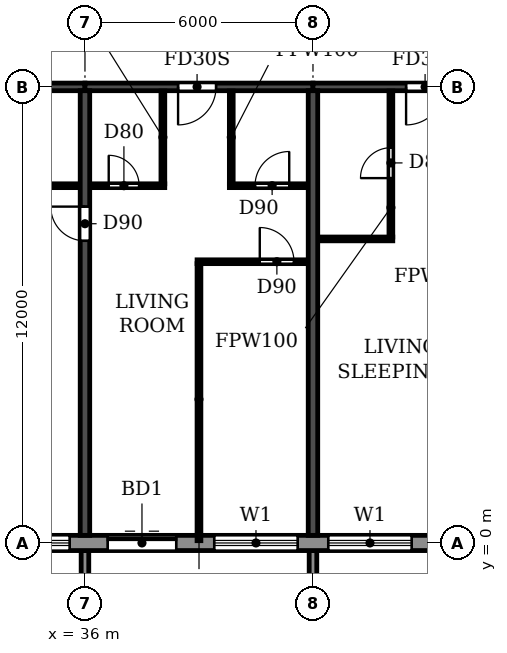
"""IFC4 building model, lengths in metres.
Left out: names, types, materials, properties, quantities, classifications, styles, units other than length and angle.
Written with IfcOpenShell. Run it as: python <this file> out.ifc"""

import sys

from ifc_helpers import new_model, si_unit, direction, frame, frame_2d, origin, place, context, subcontext, project, spatial, polyline, rectangle, outline, extrude, source, transform, mapped, element, fill, save


model = new_model("IFC4")
c1 = context("Model", 3, precision=1e-05, world=origin(), true_north=direction((0.0, 1.0)))
c2 = subcontext(c1, "Body", "Model", "MODEL_VIEW")
j1 = project(units=[si_unit("LENGTHUNIT", "METRE"), si_unit("PLANEANGLEUNIT", "RADIAN")], contexts=[c1])
p1 = place(None, origin())
s1 = spatial("IfcSite", under=j1, at=p1, CompositionType="ELEMENT")
p2 = place(p1, origin())
s2 = spatial("IfcBuilding", under=s1, at=p2, CompositionType="ELEMENT")
p3 = place(p2, frame((0.0, 0.0, 208.2)))
s3 = spatial("IfcBuildingStorey", under=s2, at=p3, CompositionType="ELEMENT", Elevation=208.2)
p4 = place(p3, frame((36.0, 0.2, 0.0), z_axis=(0.0, 0.0, 1.0), x_axis=(0.0, 1.0, 0.0)))
e1 = element("IfcWall", 1, at=p4, inside=s3, PredefinedType="SHEAR", context=c2, shape_type="SweptSolid", body=[
    extrude(rectangle(XDim=11.7, YDim=0.25, at=frame_2d((5.85, 0.0))), origin(), (0.0, 0.0, 1.0), 3.0),
])
p5 = place(p4, frame((7.75, 0.0, 0.0)))
e2 = element("IfcOpeningElement", 2, at=p5, cuts=e1, PredefinedType="OPENING", context=c2, shape_type="SweptSolid", body=[
    extrude(rectangle(XDim=0.9, YDim=2.1, at=frame_2d((0.45, 1.05))), frame((0.0, 0.135, 0.0), z_axis=(0.0, -1.0, 0.0), x_axis=(1.0, 0.0, 0.0)), (0.0, 0.0, 1.0), 0.27),
])
p6 = place(p3, frame((42.0, 0.2, 0.0), z_axis=(0.0, 0.0, 1.0), x_axis=(0.0, 1.0, 0.0)))
e3 = element("IfcWall", 3, at=p6, inside=s3, PredefinedType="SHEAR", context=c2, shape_type="SweptSolid", body=[
    extrude(rectangle(XDim=11.7, YDim=0.25, at=frame_2d((5.85, 0.0))), origin(), (0.0, 0.0, 1.0), 3.0),
])
p7 = place(p3, frame((30.0, 12.0, 0.0), z_axis=(0.0, 0.0, 1.0), x_axis=(1.0, 0.0, 0.0)))
e4 = element("IfcWall", 4, at=p7, inside=s3, PredefinedType="SHEAR", context=c2, shape_type="SweptSolid", body=[
    extrude(rectangle(XDim=6.0, YDim=0.2, at=frame_2d((3.0, 0.0))), origin(), (0.0, 0.0, 1.0), 2.4),
])
p8 = place(p3, frame((36.0, 12.0, 0.0), z_axis=(0.0, 0.0, 1.0), x_axis=(1.0, 0.0, 0.0)))
e5 = element("IfcWall", 5, at=p8, inside=s3, PredefinedType="SHEAR", context=c2, shape_type="SweptSolid", body=[
    extrude(rectangle(XDim=6.0, YDim=0.2, at=frame_2d((3.0, 0.0))), origin(), (0.0, 0.0, 1.0), 2.4),
])
p9 = place(p8, frame((2.45, 0.0, 0.0)))
e6 = element("IfcOpeningElement", 6, at=p9, cuts=e5, PredefinedType="OPENING", context=c2, shape_type="SweptSolid", body=[
    extrude(rectangle(XDim=1.0, YDim=2.1, at=frame_2d((0.5, 1.05))), frame((0.0, 0.11, 0.0), z_axis=(0.0, -1.0, 0.0), x_axis=(1.0, 0.0, 0.0)), (0.0, 0.0, 1.0), 0.22),
])
p10 = place(p3, frame((42.0, 12.0, 0.0), z_axis=(0.0, 0.0, 1.0), x_axis=(1.0, 0.0, 0.0)))
e7 = element("IfcWall", 7, at=p10, inside=s3, PredefinedType="SHEAR", context=c2, shape_type="SweptSolid", body=[
    extrude(rectangle(XDim=6.0, YDim=0.2, at=frame_2d((3.0, 0.0))), origin(), (0.0, 0.0, 1.0), 2.4),
])
p11 = place(p10, frame((2.45, 0.0, 0.0)))
e8 = element("IfcOpeningElement", 8, at=p11, cuts=e7, PredefinedType="OPENING", context=c2, shape_type="SweptSolid", body=[
    extrude(rectangle(XDim=1.0, YDim=2.1, at=frame_2d((0.5, 1.05))), frame((0.0, 0.11, 0.0), z_axis=(0.0, -1.0, 0.0), x_axis=(1.0, 0.0, 0.0)), (0.0, 0.0, 1.0), 0.22),
])
p12 = place(p3, frame((22.683, 0.0, 0.0), z_axis=(0.0, 0.0, 1.0), x_axis=(1.0, 0.0, 0.0)))
e9 = element("IfcWall", 9, at=p12, inside=s3, PredefinedType="STANDARD", context=c2, shape_type="SweptSolid", body=[
    extrude(rectangle(XDim=56.634, YDim=0.4, at=frame_2d((28.317, 0.0))), origin(), (0.0, 0.0, 1.0), 3.0),
])
p13 = place(p12, frame((1.917, 0.0, 0.0)))
e10 = element("IfcOpeningElement", 10, at=p13, cuts=e9, PredefinedType="OPENING", context=c2, shape_type="SweptSolid", body=[
    extrude(rectangle(XDim=1.8, YDim=2.4, at=frame_2d((0.9, 1.2))), frame((0.0, 0.21, 0.0), z_axis=(0.0, -1.0, 0.0), x_axis=(1.0, 0.0, 0.0)), (0.0, 0.0, 1.0), 0.42),
])
p14 = place(p12, frame((4.717, 0.0, 0.9)))
e11 = element("IfcOpeningElement", 11, at=p14, cuts=e9, PredefinedType="OPENING", context=c2, shape_type="SweptSolid", body=[
    extrude(rectangle(XDim=2.2, YDim=1.5, at=frame_2d((1.1, 0.75))), frame((0.0, 0.21, 0.0), z_axis=(0.0, -1.0, 0.0), x_axis=(1.0, 0.0, 0.0)), (0.0, 0.0, 1.0), 0.42),
])
p15 = place(p12, frame((7.717, 0.0, 0.9)))
e12 = element("IfcOpeningElement", 12, at=p15, cuts=e9, PredefinedType="OPENING", context=c2, shape_type="SweptSolid", body=[
    extrude(rectangle(XDim=2.2, YDim=1.5, at=frame_2d((1.1, 0.75))), frame((0.0, 0.21, 0.0), z_axis=(0.0, -1.0, 0.0), x_axis=(1.0, 0.0, 0.0)), (0.0, 0.0, 1.0), 0.42),
])
p16 = place(p12, frame((10.717, 0.0, 0.9)))
e13 = element("IfcOpeningElement", 13, at=p16, cuts=e9, PredefinedType="OPENING", context=c2, shape_type="SweptSolid", body=[
    extrude(rectangle(XDim=2.2, YDim=1.5, at=frame_2d((1.1, 0.75))), frame((0.0, 0.21, 0.0), z_axis=(0.0, -1.0, 0.0), x_axis=(1.0, 0.0, 0.0)), (0.0, 0.0, 1.0), 0.42),
])
p17 = place(p12, frame((13.917, 0.0, 0.0)))
e14 = element("IfcOpeningElement", 14, at=p17, cuts=e9, PredefinedType="OPENING", context=c2, shape_type="SweptSolid", body=[
    extrude(rectangle(XDim=1.8, YDim=2.4, at=frame_2d((0.9, 1.2))), frame((0.0, 0.21, 0.0), z_axis=(0.0, -1.0, 0.0), x_axis=(1.0, 0.0, 0.0)), (0.0, 0.0, 1.0), 0.42),
])
p18 = place(p12, frame((16.717, 0.0, 0.9)))
e15 = element("IfcOpeningElement", 15, at=p18, cuts=e9, PredefinedType="OPENING", context=c2, shape_type="SweptSolid", body=[
    extrude(rectangle(XDim=2.2, YDim=1.5, at=frame_2d((1.1, 0.75))), frame((0.0, 0.21, 0.0), z_axis=(0.0, -1.0, 0.0), x_axis=(1.0, 0.0, 0.0)), (0.0, 0.0, 1.0), 0.42),
])
p19 = place(p12, frame((19.717, 0.0, 0.9)))
e16 = element("IfcOpeningElement", 16, at=p19, cuts=e9, PredefinedType="OPENING", context=c2, shape_type="SweptSolid", body=[
    extrude(rectangle(XDim=2.2, YDim=1.5, at=frame_2d((1.1, 0.75))), frame((0.0, 0.21, 0.0), z_axis=(0.0, -1.0, 0.0), x_axis=(1.0, 0.0, 0.0)), (0.0, 0.0, 1.0), 0.42),
])
p20 = place(p12, frame((22.717, 0.0, 0.9)))
e17 = element("IfcOpeningElement", 17, at=p20, cuts=e9, PredefinedType="OPENING", context=c2, shape_type="SweptSolid", body=[
    extrude(rectangle(XDim=2.2, YDim=1.5, at=frame_2d((1.1, 0.75))), frame((0.0, 0.21, 0.0), z_axis=(0.0, -1.0, 0.0), x_axis=(1.0, 0.0, 0.0)), (0.0, 0.0, 1.0), 0.42),
])
p21 = place(p12, frame((25.917, 0.0, 0.0)))
e18 = element("IfcOpeningElement", 18, at=p21, cuts=e9, PredefinedType="OPENING", context=c2, shape_type="SweptSolid", body=[
    extrude(rectangle(XDim=1.8, YDim=2.4, at=frame_2d((0.9, 1.2))), frame((0.0, 0.21, 0.0), z_axis=(0.0, -1.0, 0.0), x_axis=(1.0, 0.0, 0.0)), (0.0, 0.0, 1.0), 0.42),
])
p22 = place(p12, frame((28.717, 0.0, 0.9)))
e19 = element("IfcOpeningElement", 19, at=p22, cuts=e9, PredefinedType="OPENING", context=c2, shape_type="SweptSolid", body=[
    extrude(rectangle(XDim=2.2, YDim=1.5, at=frame_2d((1.1, 0.75))), frame((0.0, 0.21, 0.0), z_axis=(0.0, -1.0, 0.0), x_axis=(1.0, 0.0, 0.0)), (0.0, 0.0, 1.0), 0.42),
])
p23 = place(p12, frame((31.717, 0.0, 0.9)))
e20 = element("IfcOpeningElement", 20, at=p23, cuts=e9, PredefinedType="OPENING", context=c2, shape_type="SweptSolid", body=[
    extrude(rectangle(XDim=2.2, YDim=1.5, at=frame_2d((1.1, 0.75))), frame((0.0, 0.21, 0.0), z_axis=(0.0, -1.0, 0.0), x_axis=(1.0, 0.0, 0.0)), (0.0, 0.0, 1.0), 0.42),
])
p24 = place(p12, frame((34.717, 0.0, 0.9)))
e21 = element("IfcOpeningElement", 21, at=p24, cuts=e9, PredefinedType="OPENING", context=c2, shape_type="SweptSolid", body=[
    extrude(rectangle(XDim=2.2, YDim=1.5, at=frame_2d((1.1, 0.75))), frame((0.0, 0.21, 0.0), z_axis=(0.0, -1.0, 0.0), x_axis=(1.0, 0.0, 0.0)), (0.0, 0.0, 1.0), 0.42),
])
p25 = place(p12, frame((37.717, 0.0, 0.9)))
e22 = element("IfcOpeningElement", 22, at=p25, cuts=e9, PredefinedType="OPENING", context=c2, shape_type="SweptSolid", body=[
    extrude(rectangle(XDim=2.2, YDim=1.5, at=frame_2d((1.1, 0.75))), frame((0.0, 0.21, 0.0), z_axis=(0.0, -1.0, 0.0), x_axis=(1.0, 0.0, 0.0)), (0.0, 0.0, 1.0), 0.42),
])
p26 = place(p12, frame((40.717, 0.0, 0.9)))
e23 = element("IfcOpeningElement", 23, at=p26, cuts=e9, PredefinedType="OPENING", context=c2, shape_type="SweptSolid", body=[
    extrude(rectangle(XDim=2.2, YDim=1.5, at=frame_2d((1.1, 0.75))), frame((0.0, 0.21, 0.0), z_axis=(0.0, -1.0, 0.0), x_axis=(1.0, 0.0, 0.0)), (0.0, 0.0, 1.0), 0.42),
])
p27 = place(p12, frame((43.717, 0.0, 0.9)))
e24 = element("IfcOpeningElement", 24, at=p27, cuts=e9, PredefinedType="OPENING", context=c2, shape_type="SweptSolid", body=[
    extrude(rectangle(XDim=2.2, YDim=1.5, at=frame_2d((1.1, 0.75))), frame((0.0, 0.21, 0.0), z_axis=(0.0, -1.0, 0.0), x_axis=(1.0, 0.0, 0.0)), (0.0, 0.0, 1.0), 0.42),
])
p28 = place(p12, frame((46.717, 0.0, 0.9)))
e25 = element("IfcOpeningElement", 25, at=p28, cuts=e9, PredefinedType="OPENING", context=c2, shape_type="SweptSolid", body=[
    extrude(rectangle(XDim=2.2, YDim=1.5, at=frame_2d((1.1, 0.75))), frame((0.0, 0.21, 0.0), z_axis=(0.0, -1.0, 0.0), x_axis=(1.0, 0.0, 0.0)), (0.0, 0.0, 1.0), 0.42),
])
p29 = place(p12, frame((49.717, 0.0, 0.9)))
e26 = element("IfcOpeningElement", 26, at=p29, cuts=e9, PredefinedType="OPENING", context=c2, shape_type="SweptSolid", body=[
    extrude(rectangle(XDim=2.2, YDim=1.5, at=frame_2d((1.1, 0.75))), frame((0.0, 0.21, 0.0), z_axis=(0.0, -1.0, 0.0), x_axis=(1.0, 0.0, 0.0)), (0.0, 0.0, 1.0), 0.42),
])
p30 = place(p12, frame((52.917, 0.0, 0.0)))
e27 = element("IfcOpeningElement", 27, at=p30, cuts=e9, PredefinedType="OPENING", context=c2, shape_type="SweptSolid", body=[
    extrude(rectangle(XDim=1.8, YDim=2.4, at=frame_2d((0.9, 1.2))), frame((0.0, 0.21, 0.0), z_axis=(0.0, -1.0, 0.0), x_axis=(1.0, 0.0, 0.0)), (0.0, 0.0, 1.0), 0.42),
])
m1 = source(origin(), c2, "Body", "SweptSolid", [
    extrude(outline(polyline([(0.0, 0.0), (0.2, 0.0), (0.2, 1.65), (0.0, 1.65), (0.0, 0.0)])), origin(), (0.0, 0.0, 1.0), 3.1),
])
for number, where in (
    (28, (35.9, -1.85, 0.0)),
    (29, (41.9, -1.85, 0.0)),
):
    element("IfcWall", number, at=place(p3, frame(where)), inside=s3, PredefinedType="STANDARD", context=c2, shape_type="MappedRepresentation", body=[
        mapped(m1, transform((0.0, 0.0, 0.0))),
    ])
p31 = place(p3, frame((38.95, 7.4, 0.0), z_axis=(0.0, 0.0, 1.0), x_axis=(1.0, 0.0, 0.0)))
e30 = element("IfcWall", 30, at=p31, inside=s3, PredefinedType="PARTITIONING", context=c2, shape_type="SweptSolid", body=[
    extrude(rectangle(XDim=2.915, YDim=0.1, at=frame_2d((1.458, 0.0))), origin(), (0.0, 0.0, 1.0), 3.0),
])
p32 = place(p31, frame((1.65, 0.0, 0.0)))
e31 = element("IfcOpeningElement", 31, at=p32, cuts=e30, PredefinedType="OPENING", context=c2, shape_type="SweptSolid", body=[
    extrude(rectangle(XDim=0.9, YDim=2.1, at=frame_2d((0.45, 1.05))), frame((0.0, 0.06, 0.0), z_axis=(0.0, -1.0, 0.0), x_axis=(1.0, 0.0, 0.0)), (0.0, 0.0, 1.0), 0.12),
])
p33 = place(p3, frame((42.135, 8.0, 0.0), z_axis=(0.0, 0.0, 1.0), x_axis=(1.0, 0.0, 0.0)))
e32 = element("IfcWall", 32, at=p33, inside=s3, PredefinedType="PARTITIONING", context=c2, shape_type="SweptSolid", body=[
    extrude(rectangle(XDim=1.965, YDim=0.1, at=frame_2d((0.982, 0.0))), origin(), (0.0, 0.0, 1.0), 3.0),
])
p34 = place(p3, frame((33.1, 9.4, 0.0), z_axis=(0.0, 0.0, 1.0), x_axis=(1.0, 0.0, 0.0)))
e33 = element("IfcWall", 33, at=p34, inside=s3, PredefinedType="PARTITIONING", context=c2, shape_type="SweptSolid", body=[
    extrude(rectangle(XDim=2.765, YDim=0.1, at=frame_2d((1.382, 0.0))), origin(), (0.0, 0.0, 1.0), 3.0),
])
p35 = place(p34, frame((1.0, 0.0, 0.0)))
e34 = element("IfcOpeningElement", 34, at=p35, cuts=e33, PredefinedType="OPENING", context=c2, shape_type="SweptSolid", body=[
    extrude(rectangle(XDim=0.8, YDim=2.1, at=frame_2d((0.4, 1.05))), frame((0.0, 0.06, 0.0), z_axis=(0.0, -1.0, 0.0), x_axis=(1.0, 0.0, 0.0)), (0.0, 0.0, 1.0), 0.12),
])
p36 = place(p3, frame((36.135, 9.4, 0.0), z_axis=(0.0, 0.0, 1.0), x_axis=(1.0, 0.0, 0.0)))
e35 = element("IfcWall", 35, at=p36, inside=s3, PredefinedType="PARTITIONING", context=c2, shape_type="SweptSolid", body=[
    extrude(rectangle(XDim=1.965, YDim=0.1, at=frame_2d((0.982, 0.0))), origin(), (0.0, 0.0, 1.0), 3.0),
])
p37 = place(p36, frame((0.49, 0.0, 0.0)))
e36 = element("IfcOpeningElement", 36, at=p37, cuts=e35, PredefinedType="OPENING", context=c2, shape_type="SweptSolid", body=[
    extrude(rectangle(XDim=0.8, YDim=2.1, at=frame_2d((0.4, 1.05))), frame((0.0, 0.06, 0.0), z_axis=(0.0, -1.0, 0.0), x_axis=(1.0, 0.0, 0.0)), (0.0, 0.0, 1.0), 0.12),
])
p38 = place(p3, frame((39.8, 9.4, 0.0), z_axis=(0.0, 0.0, 1.0), x_axis=(1.0, 0.0, 0.0)))
e37 = element("IfcWall", 37, at=p38, inside=s3, PredefinedType="PARTITIONING", context=c2, shape_type="SweptSolid", body=[
    extrude(rectangle(XDim=2.065, YDim=0.1, at=frame_2d((1.032, 0.0))), origin(), (0.0, 0.0, 1.0), 3.0),
])
p39 = place(p38, frame((0.675, 0.0, 0.0)))
e38 = element("IfcOpeningElement", 38, at=p39, cuts=e37, PredefinedType="OPENING", context=c2, shape_type="SweptSolid", body=[
    extrude(rectangle(XDim=0.9, YDim=2.1, at=frame_2d((0.45, 1.05))), frame((0.0, 0.06, 0.0), z_axis=(0.0, -1.0, 0.0), x_axis=(1.0, 0.0, 0.0)), (0.0, 0.0, 1.0), 0.12),
])
p40 = place(p3, frame((38.05, 9.45, 0.0), z_axis=(0.0, 0.0, 1.0), x_axis=(0.0, 1.0, 0.0)))
e39 = element("IfcWall", 39, at=p40, inside=s3, PredefinedType="PARTITIONING", context=c2, shape_type="SweptSolid", body=[
    extrude(rectangle(XDim=2.44, YDim=0.1, at=frame_2d((1.22, 0.0))), origin(), (0.0, 0.0, 1.0), 3.0),
])
p41 = place(p3, frame((39.0, 0.06, 0.0), z_axis=(0.0, 0.0, 1.0), x_axis=(0.0, 1.0, 0.0)))
e40 = element("IfcWall", 40, at=p41, inside=s3, PredefinedType="PARTITIONING", context=c2, shape_type="SweptSolid", body=[
    extrude(rectangle(XDim=7.29, YDim=0.1, at=frame_2d((3.645, 0.0))), origin(), (0.0, 0.0, 1.0), 3.0),
])
p42 = place(p3, frame((39.85, 9.45, 0.0), z_axis=(0.0, 0.0, 1.0), x_axis=(0.0, 1.0, 0.0)))
e41 = element("IfcWall", 41, at=p42, inside=s3, PredefinedType="PARTITIONING", context=c2, shape_type="SweptSolid", body=[
    extrude(rectangle(XDim=2.44, YDim=0.1, at=frame_2d((1.22, 0.0))), origin(), (0.0, 0.0, 1.0), 3.0),
])
p43 = place(p3, frame((44.05, 8.05, 0.0), z_axis=(0.0, 0.0, 1.0), x_axis=(0.0, 1.0, 0.0)))
e42 = element("IfcWall", 42, at=p43, inside=s3, PredefinedType="PARTITIONING", context=c2, shape_type="SweptSolid", body=[
    extrude(rectangle(XDim=3.84, YDim=0.1, at=frame_2d((1.92, 0.0))), origin(), (0.0, 0.0, 1.0), 3.0),
])
p44 = place(p43, frame((1.55, 0.0, 0.0)))
e43 = element("IfcOpeningElement", 43, at=p44, cuts=e42, PredefinedType="OPENING", context=c2, shape_type="SweptSolid", body=[
    extrude(rectangle(XDim=0.8, YDim=2.1, at=frame_2d((0.4, 1.05))), frame((0.0, 0.06, 0.0), z_axis=(0.0, -1.0, 0.0), x_axis=(1.0, 0.0, 0.0)), (0.0, 0.0, 1.0), 0.12),
])
p45 = place(p16, origin())
e44 = element("IfcWindow", 44, at=p45, inside=s3, PartitioningType="DOUBLE_PANEL_HORIZONTAL", PredefinedType="WINDOW", context=c2, shape_type="SweptSolid", body=[
    extrude(rectangle(XDim=2.2, YDim=1.5, at=frame_2d((1.1, 0.75))), frame((0.0, 0.03, 0.0), z_axis=(0.0, -1.0, 0.0), x_axis=(1.0, 0.0, 0.0)), (0.0, 0.0, 1.0), 0.06),
])
fill(e13, e44)
p46 = place(p17, origin())
e45 = element("IfcDoor", 45, at=p46, inside=s3, OperationType="DOUBLE_DOOR_SLIDING", PredefinedType="DOOR", context=c2, shape_type="SweptSolid", body=[
    extrude(rectangle(XDim=1.8, YDim=2.4, at=frame_2d((0.9, 1.2))), frame((0.0, 0.025, 0.0), z_axis=(0.0, -1.0, 0.0), x_axis=(1.0, 0.0, 0.0)), (0.0, 0.0, 1.0), 0.05),
])
fill(e14, e45)
p47 = place(p18, origin())
e46 = element("IfcWindow", 46, at=p47, inside=s3, PartitioningType="DOUBLE_PANEL_HORIZONTAL", PredefinedType="WINDOW", context=c2, shape_type="SweptSolid", body=[
    extrude(rectangle(XDim=2.2, YDim=1.5, at=frame_2d((1.1, 0.75))), frame((0.0, 0.03, 0.0), z_axis=(0.0, -1.0, 0.0), x_axis=(1.0, 0.0, 0.0)), (0.0, 0.0, 1.0), 0.06),
])
fill(e15, e46)
p48 = place(p19, origin())
e47 = element("IfcWindow", 47, at=p48, inside=s3, PartitioningType="DOUBLE_PANEL_HORIZONTAL", PredefinedType="WINDOW", context=c2, shape_type="SweptSolid", body=[
    extrude(rectangle(XDim=2.2, YDim=1.5, at=frame_2d((1.1, 0.75))), frame((0.0, 0.03, 0.0), z_axis=(0.0, -1.0, 0.0), x_axis=(1.0, 0.0, 0.0)), (0.0, 0.0, 1.0), 0.06),
])
fill(e16, e47)
p49 = place(p5, origin())
e48 = element("IfcDoor", 48, at=p49, inside=s3, OperationType="SINGLE_SWING_RIGHT", PredefinedType="DOOR", context=c2, shape_type="SweptSolid", body=[
    extrude(rectangle(XDim=0.9, YDim=2.1, at=frame_2d((0.45, 1.05))), frame((0.0, 0.025, 0.0), z_axis=(0.0, -1.0, 0.0), x_axis=(1.0, 0.0, 0.0)), (0.0, 0.0, 1.0), 0.05),
])
fill(e2, e48)
p50 = place(p37, origin())
e49 = element("IfcDoor", 49, at=p50, inside=s3, OperationType="SINGLE_SWING_LEFT", PredefinedType="DOOR", context=c2, shape_type="SweptSolid", body=[
    extrude(rectangle(XDim=0.8, YDim=2.1, at=frame_2d((0.4, 1.05))), frame((0.0, 0.025, 0.0), z_axis=(0.0, -1.0, 0.0), x_axis=(1.0, 0.0, 0.0)), (0.0, 0.0, 1.0), 0.05),
])
fill(e36, e49)
p51 = place(p9, frame((1.0, 0.0, 0.0), z_axis=(0.0, 0.0, 1.0), x_axis=(-1.0, 0.0, 0.0)))
e50 = element("IfcDoor", 50, at=p51, inside=s3, OperationType="SINGLE_SWING_RIGHT", PredefinedType="DOOR", context=c2, shape_type="SweptSolid", body=[
    extrude(rectangle(XDim=1.0, YDim=2.1, at=frame_2d((0.5, 1.05))), frame((0.0, 0.025, 0.0), z_axis=(0.0, -1.0, 0.0), x_axis=(1.0, 0.0, 0.0)), (0.0, 0.0, 1.0), 0.05),
])
fill(e6, e50)
p52 = place(p39, origin())
e51 = element("IfcDoor", 51, at=p52, inside=s3, OperationType="SINGLE_SWING_RIGHT", PredefinedType="DOOR", context=c2, shape_type="SweptSolid", body=[
    extrude(rectangle(XDim=0.9, YDim=2.1, at=frame_2d((0.45, 1.05))), frame((0.0, 0.025, 0.0), z_axis=(0.0, -1.0, 0.0), x_axis=(1.0, 0.0, 0.0)), (0.0, 0.0, 1.0), 0.05),
])
fill(e38, e51)
p53 = place(p32, origin())
e52 = element("IfcDoor", 52, at=p53, inside=s3, OperationType="SINGLE_SWING_LEFT", PredefinedType="DOOR", context=c2, shape_type="SweptSolid", body=[
    extrude(rectangle(XDim=0.9, YDim=2.1, at=frame_2d((0.45, 1.05))), frame((0.0, 0.025, 0.0), z_axis=(0.0, -1.0, 0.0), x_axis=(1.0, 0.0, 0.0)), (0.0, 0.0, 1.0), 0.05),
])
fill(e31, e52)
p54 = place(p44, origin())
e53 = element("IfcDoor", 53, at=p54, inside=s3, OperationType="SINGLE_SWING_LEFT", PredefinedType="DOOR", context=c2, shape_type="SweptSolid", body=[
    extrude(rectangle(XDim=0.8, YDim=2.1, at=frame_2d((0.4, 1.05))), frame((0.0, 0.025, 0.0), z_axis=(0.0, -1.0, 0.0), x_axis=(1.0, 0.0, 0.0)), (0.0, 0.0, 1.0), 0.05),
])
fill(e43, e53)
p55 = place(p11, frame((1.0, 0.0, 0.0), z_axis=(0.0, 0.0, 1.0), x_axis=(-1.0, 0.0, 0.0)))
e54 = element("IfcDoor", 54, at=p55, inside=s3, OperationType="SINGLE_SWING_RIGHT", PredefinedType="DOOR", context=c2, shape_type="SweptSolid", body=[
    extrude(rectangle(XDim=1.0, YDim=2.1, at=frame_2d((0.5, 1.05))), frame((0.0, 0.025, 0.0), z_axis=(0.0, -1.0, 0.0), x_axis=(1.0, 0.0, 0.0)), (0.0, 0.0, 1.0), 0.05),
])
fill(e8, e54)
save(model, sys.argv[1])
